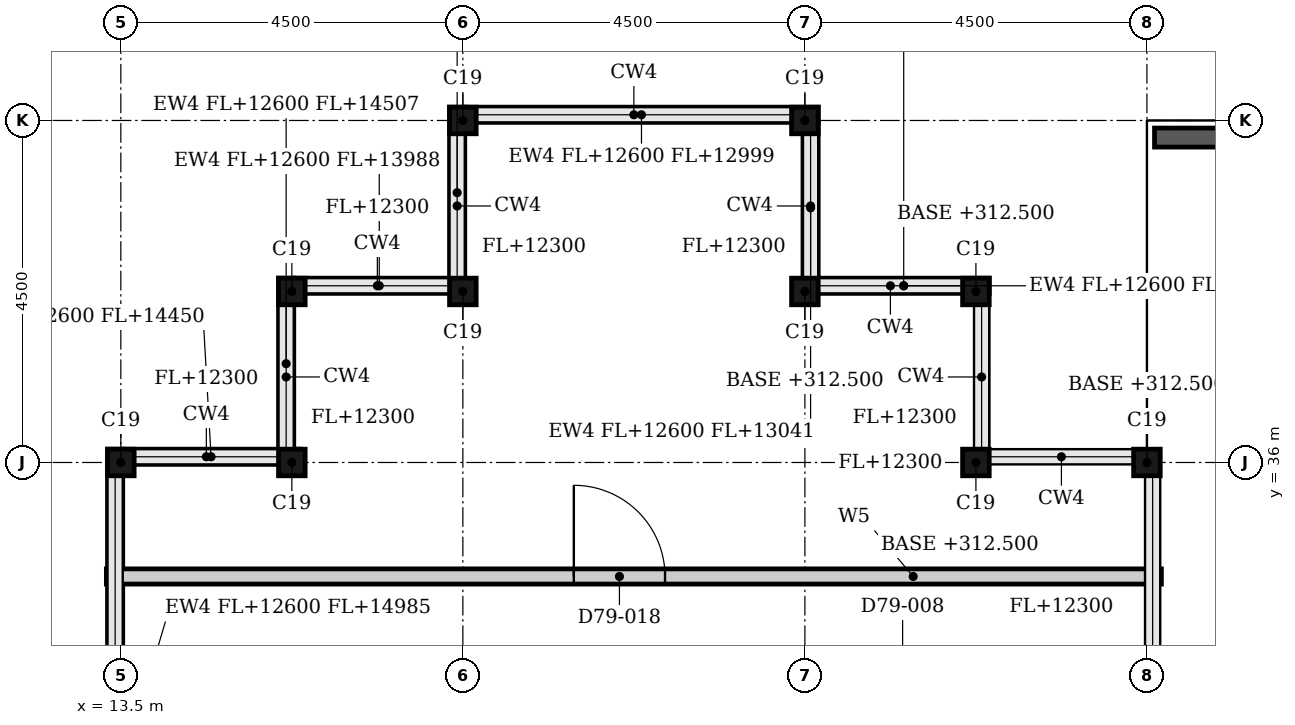
"""IFC4 building model, lengths in metres.
Left out: names, types, materials, properties, quantities, classifications, styles, units other than length and angle.
Written with IfcOpenShell. Run it as: python <this file> out.ifc"""

import sys

from ifc_helpers import new_model, si_unit, direction, frame, frame_2d, origin, origin_2d, place, context, subcontext, project, spatial, polyline, rectangle, i_section, outline, extrude, element, fill, save


model = new_model("IFC4")
c1 = context("Model", 3, precision=1e-05, world=origin(), true_north=direction((0.0, 1.0)))
c2 = subcontext(c1, "Body", "Model", "MODEL_VIEW")
j1 = project(units=[si_unit("LENGTHUNIT", "METRE"), si_unit("PLANEANGLEUNIT", "RADIAN")], contexts=[c1])
p1 = place(None, origin())
s1 = spatial("IfcSite", under=j1, at=p1, CompositionType="ELEMENT")
p2 = place(p1, origin())
s2 = spatial("IfcBuilding", under=s1, at=p2, CompositionType="ELEMENT")
p3 = place(p2, frame((0.0, 0.0, 312.8)))
s3 = spatial("IfcBuildingStorey", under=s2, at=p3, CompositionType="ELEMENT", Elevation=312.8)
for number, where, z_axis, x_axis in (
    (1, (27.0, 36.0, -0.3), (0.0, 0.0, 1.0), (1.0, 0.0, 0.0)),
    (2, (24.75, 36.0, -0.3), (0.0, 0.0, 1.0), (1.0, 0.0, 0.0)),
    (3, (24.75, 38.25, -0.3), (0.0, 0.0, 1.0), (1.0, 0.0, 0.0)),
    (4, (22.5, 38.25, -0.3), (0.0, 0.0, 1.0), (1.0, 0.0, 0.0)),
    (5, (22.5, 40.5, -0.3), (0.0, 0.0, 1.0), (1.0, 0.0, 0.0)),
):
    element("IfcColumn", number, at=place(p3, frame(where, z_axis=z_axis, x_axis=x_axis)), inside=s3, PredefinedType="COLUMN", context=c2, shape_type="SweptSolid", body=[
        extrude(i_section(OverallWidth=0.35, OverallDepth=0.35, WebThickness=0.012, FlangeThickness=0.019, FilletRadius=0.013, at=origin_2d()), origin(), (0.0, 0.0, 1.0), 4.5),
    ])
for number, where, z_axis, x_axis in (
    (6, (18.0, 40.5, 0.0), (0.0, 0.0, 1.0), (1.0, 0.0, 0.0)),
    (7, (18.0, 38.25, 0.0), (0.0, 0.0, 1.0), (1.0, 0.0, 0.0)),
    (8, (15.75, 38.25, 0.0), (0.0, 0.0, 1.0), (1.0, 0.0, 0.0)),
    (9, (15.75, 36.0, 0.0), (0.0, 0.0, 1.0), (1.0, 0.0, 0.0)),
    (10, (13.5, 36.0, 0.0), (0.0, 0.0, 1.0), (1.0, 0.0, 0.0)),
):
    element("IfcColumn", number, at=place(p3, frame(where, z_axis=z_axis, x_axis=x_axis)), inside=s3, PredefinedType="COLUMN", context=c2, shape_type="SweptSolid", body=[
        extrude(i_section(OverallWidth=0.35, OverallDepth=0.35, WebThickness=0.012, FlangeThickness=0.019, FilletRadius=0.013, at=origin_2d()), origin(), (0.0, 0.0, 1.0), 4.2),
    ])
p4 = place(p3, frame((27.1, 40.275, 0.0), z_axis=(0.0, 0.0, 1.0), x_axis=(1.0, 0.0, 0.0)))
e11 = element("IfcWall", 11, at=p4, inside=s3, PredefinedType="PARAPET", context=c2, shape_type="SweptSolid", body=[
    extrude(rectangle(XDim=4.3, YDim=0.25, at=frame_2d((2.15, 0.0))), origin(), (0.0, 0.0, 1.0), 1.1),
])
p5 = place(p3, frame((24.925, 38.325, 12.6), z_axis=(0.0, 0.0, 1.0), x_axis=(-1.0, 0.0, 0.0)))
e12 = element("IfcWall", 12, at=p5, inside=s3, PredefinedType="SOLIDWALL", context=c2, shape_type="SweptSolid", body=[
    extrude(outline(polyline([(0.0, 0.0), (2.25, 0.0), (2.25, 0.419), (0.0, 0.0)])), frame((0.0, 0.1, 0.0), z_axis=(0.0, -1.0, 0.0), x_axis=(1.0, 0.0, 0.0)), (0.0, 0.0, 1.0), 0.2),
])
p6 = place(p3, frame((22.575, 38.225, 12.6), z_axis=(0.0, 0.0, 1.0), x_axis=(0.0, 1.0, 0.0)))
e13 = element("IfcWall", 13, at=p6, inside=s3, PredefinedType="SOLIDWALL", context=c2, shape_type="SweptSolid", body=[
    extrude(rectangle(XDim=2.25, YDim=0.2, at=frame_2d((1.125, 0.0))), origin(), (0.0, 0.0, 1.0), 0.441),
])
p7 = place(p3, frame((22.675, 40.575, 12.6), z_axis=(0.0, 0.0, 1.0), x_axis=(-1.0, 0.0, 0.0)))
e14 = element("IfcWall", 14, at=p7, inside=s3, PredefinedType="SOLIDWALL", context=c2, shape_type="SweptSolid", body=[
    extrude(rectangle(XDim=4.65, YDim=0.2, at=frame_2d((2.325, 0.0))), origin(), (0.0, 0.0, 1.0), 0.399),
])
p8 = place(p3, frame((17.925, 40.675, 12.6), z_axis=(0.0, 0.0, 1.0), x_axis=(0.0, -1.0, 0.0)))
e15 = element("IfcWall", 15, at=p8, inside=s3, PredefinedType="SOLIDWALL", context=c2, shape_type="SweptSolid", body=[
    extrude(rectangle(XDim=2.25, YDim=0.2, at=frame_2d((1.125, 0.0))), origin(), (0.0, 0.0, 1.0), 1.429),
])
p9 = place(p3, frame((18.025, 38.325, 12.6), z_axis=(0.0, 0.0, 1.0), x_axis=(-1.0, 0.0, 0.0)))
e16 = element("IfcWall", 16, at=p9, inside=s3, PredefinedType="SOLIDWALL", context=c2, shape_type="SweptSolid", body=[
    extrude(rectangle(XDim=2.25, YDim=0.2, at=frame_2d((1.125, 0.0))), origin(), (0.0, 0.0, 1.0), 1.388),
])
p10 = place(p3, frame((15.675, 38.425, 12.6), z_axis=(0.0, 0.0, 1.0), x_axis=(0.0, -1.0, 0.0)))
e17 = element("IfcWall", 17, at=p10, inside=s3, PredefinedType="SOLIDWALL", context=c2, shape_type="SweptSolid", body=[
    extrude(rectangle(XDim=2.25, YDim=0.2, at=frame_2d((1.125, 0.0))), origin(), (0.0, 0.0, 1.0), 1.907),
])
p11 = place(p3, frame((15.85, 36.075, 12.6), z_axis=(0.0, 0.0, 1.0), x_axis=(-1.0, 0.0, 0.0)))
e18 = element("IfcWall", 18, at=p11, inside=s3, PredefinedType="SOLIDWALL", context=c2, shape_type="SweptSolid", body=[
    extrude(rectangle(XDim=2.325, YDim=0.2, at=frame_2d((1.163, 0.0))), origin(), (0.0, 0.0, 1.0), 1.85),
])
p12 = place(p3, frame((13.425, 36.175, 12.6), z_axis=(0.0, 0.0, 1.0), x_axis=(0.0, -1.0, 0.0)))
e19 = element("IfcWall", 19, at=p12, inside=s3, PredefinedType="SOLIDWALL", context=c2, shape_type="SweptSolid", body=[
    extrude(rectangle(XDim=9.0, YDim=0.2, at=frame_2d((4.5, 0.0))), origin(), (0.0, 0.0, 1.0), 2.385),
])
p13 = place(p3, frame((13.31, 34.5, 0.0), z_axis=(0.0, 0.0, 1.0), x_axis=(1.0, 0.0, 0.0)))
e20 = element("IfcWall", 20, at=p13, inside=s3, PredefinedType="PARTITIONING", context=c2, shape_type="SweptSolid", body=[
    extrude(rectangle(XDim=13.88, YDim=0.2, at=frame_2d((6.94, 0.0))), origin(), (0.0, 0.0, 1.0), 3.9),
])
p14 = place(p13, frame((6.15, 0.0, 0.0)))
e21 = element("IfcOpeningElement", 21, at=p14, cuts=e20, PredefinedType="OPENING", context=c2, shape_type="SweptSolid", body=[
    extrude(rectangle(XDim=1.2, YDim=2.1, at=frame_2d((0.6, 1.05))), frame((0.0, 0.11, 0.0), z_axis=(0.0, -1.0, 0.0), x_axis=(1.0, 0.0, 0.0)), (0.0, 0.0, 1.0), 0.22),
])
p15 = place(p14, origin())
e22 = element("IfcDoor", 22, at=p15, inside=s3, OperationType="SINGLE_SWING_LEFT", PredefinedType="DOOR", context=c2, shape_type="SweptSolid", body=[
    extrude(rectangle(XDim=1.2, YDim=2.1, at=frame_2d((0.6, 1.05))), frame((0.0, 0.025, 0.0), z_axis=(0.0, -1.0, 0.0), x_axis=(1.0, 0.0, 0.0)), (0.0, 0.0, 1.0), 0.05),
])
fill(e21, e22)
save(model, sys.argv[1])
